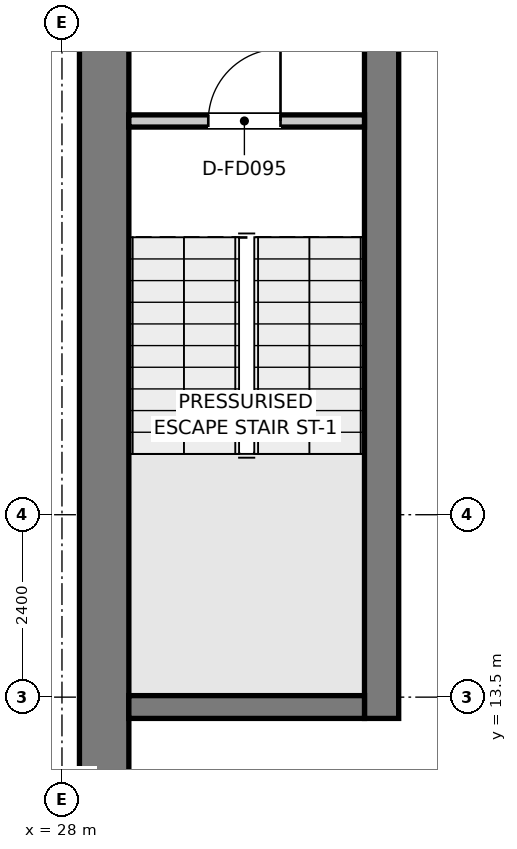
"""IFC4 building model, lengths in metres.
Left out: names, types, materials, properties, quantities, classifications, styles, units other than length and angle.
Written with IfcOpenShell. Run it as: python <this file> out.ifc"""

import sys

from ifc_helpers import new_model, si_unit, direction, frame, frame_2d, origin, place, context, subcontext, project, spatial, rectangle, extrude, element, fill, save


model = new_model("IFC4")
c1 = context("Model", 3, precision=1e-05, world=origin(), true_north=direction((0.0, 1.0)))
c2 = subcontext(c1, "Body", "Model", "MODEL_VIEW")
j1 = project(units=[si_unit("LENGTHUNIT", "METRE"), si_unit("PLANEANGLEUNIT", "RADIAN")], contexts=[c1])
p1 = place(None, origin())
s1 = spatial("IfcSite", under=j1, at=p1, CompositionType="ELEMENT")
p2 = place(p1, origin())
s2 = spatial("IfcBuilding", under=s1, at=p2, CompositionType="ELEMENT")
p3 = place(p2, frame((0.0, 0.0, 374.65)))
s3 = spatial("IfcBuildingStorey", under=s2, at=p3, CompositionType="ELEMENT", Elevation=374.65)
p4 = place(p3, frame((28.555, 11.15, 0.0), z_axis=(0.0, 0.0, 1.0), x_axis=(0.0, 1.0, 0.0)))
e1 = element("IfcWall", 1, at=p4, inside=s3, PredefinedType="SHEAR", context=c2, shape_type="SweptSolid", body=[
    extrude(rectangle(XDim=15.0, YDim=0.65, at=frame_2d((7.5, 0.0))), origin(), (0.0, 0.0, 1.0), 3.6),
])
p5 = place(p3, frame((32.205, 13.22, 0.0), z_axis=(0.0, 0.0, 1.0), x_axis=(0.0, 1.0, 0.0)))
e2 = element("IfcWall", 2, at=p5, inside=s3, PredefinedType="SHEAR", context=c2, shape_type="SweptSolid", body=[
    extrude(rectangle(XDim=12.93, YDim=0.45, at=frame_2d((6.465, 0.0))), origin(), (0.0, 0.0, 1.0), 3.6),
])
p6 = place(p5, frame((10.58, 0.0, 0.0)))
e3 = element("IfcOpeningElement", 3, at=p6, cuts=e2, PredefinedType="OPENING", context=c2, shape_type="SweptSolid", body=[
    extrude(rectangle(XDim=1.1, YDim=2.15, at=frame_2d((0.55, 1.075))), frame((0.0, 0.235, 0.0), z_axis=(0.0, -1.0, 0.0), x_axis=(1.0, 0.0, 0.0)), (0.0, 0.0, 1.0), 0.47),
])
p7 = place(p3, frame((28.88, 13.37, 0.0), z_axis=(0.0, 0.0, 1.0), x_axis=(1.0, 0.0, 0.0)))
e4 = element("IfcWall", 4, at=p7, inside=s3, PredefinedType="SHEAR", context=c2, shape_type="SweptSolid", body=[
    extrude(rectangle(XDim=3.1, YDim=0.3, at=frame_2d((1.55, 0.0))), origin(), (0.0, 0.0, 1.0), 3.6),
])
p8 = place(p3, frame((28.88, 21.08, 0.0), z_axis=(0.0, 0.0, 1.0), x_axis=(1.0, 0.0, 0.0)))
e5 = element("IfcWall", 5, at=p8, inside=s3, PredefinedType="PARTITIONING", context=c2, shape_type="SweptSolid", body=[
    extrude(rectangle(XDim=3.1, YDim=0.16, at=frame_2d((1.55, 0.0))), origin(), (0.0, 0.0, 1.0), 3.3),
])
p9 = place(p8, frame((1.045, 0.0, 0.0)))
e6 = element("IfcOpeningElement", 6, at=p9, cuts=e5, PredefinedType="OPENING", context=c2, shape_type="SweptSolid", body=[
    extrude(rectangle(XDim=0.95, YDim=2.1, at=frame_2d((0.475, 1.05))), frame((0.0, 0.09, 0.0), z_axis=(0.0, -1.0, 0.0), x_axis=(1.0, 0.0, 0.0)), (0.0, 0.0, 1.0), 0.18),
])
p10 = place(p9, origin())
e7 = element("IfcDoor", 7, at=p10, inside=s3, OperationType="SINGLE_SWING_RIGHT", PredefinedType="DOOR", context=c2, shape_type="SweptSolid", body=[
    extrude(rectangle(XDim=0.95, YDim=2.1, at=frame_2d((0.475, 1.05))), frame((0.0, 0.025, 0.0), z_axis=(0.0, -1.0, 0.0), x_axis=(1.0, 0.0, 0.0)), (0.0, 0.0, 1.0), 0.05),
])
fill(e6, e7)
save(model, sys.argv[1])
